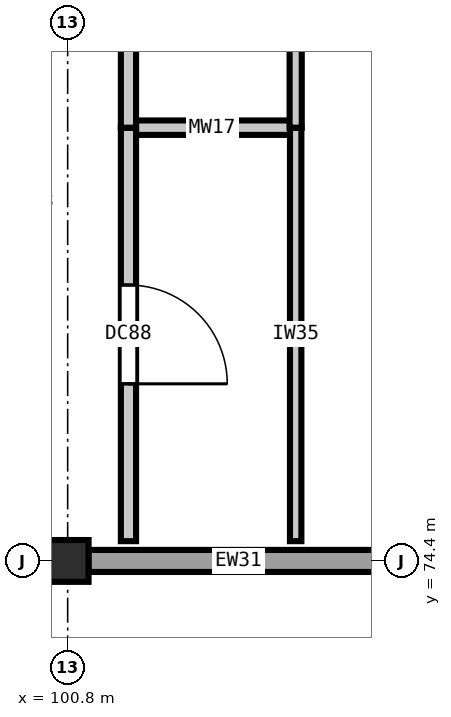
"""IFC4 building model, lengths in metres.
Left out: names, types, materials, properties, quantities, classifications, styles, units other than length and angle.
Written with IfcOpenShell. Run it as: python <this file> out.ifc"""

import sys

from ifc_helpers import new_model, si_unit, direction, frame, frame_2d, origin, origin_2d, place, context, subcontext, project, spatial, rectangle, extrude, element, fill, save


model = new_model("IFC4")
c1 = context("Model", 3, precision=1e-05, world=origin(), true_north=direction((0.0, 1.0)))
c2 = subcontext(c1, "Body", "Model", "MODEL_VIEW")
j1 = project(units=[si_unit("LENGTHUNIT", "METRE"), si_unit("PLANEANGLEUNIT", "RADIAN")], contexts=[c1])
p1 = place(None, origin())
s1 = spatial("IfcSite", under=j1, at=p1, CompositionType="ELEMENT")
p2 = place(p1, origin())
s2 = spatial("IfcBuilding", under=s1, at=p2, CompositionType="ELEMENT")
p3 = place(p2, frame((0.0, 0.0, 20.4)))
s3 = spatial("IfcBuildingStorey", under=s2, at=p3, CompositionType="ELEMENT", Elevation=20.4)
p4 = place(p3, frame((100.8, 74.4, 0.0), z_axis=(0.0, 0.0, 1.0), x_axis=(1.0, 0.0, 0.0)))
e1 = element("IfcColumn", 1, at=p4, inside=s3, PredefinedType="COLUMN", context=c2, shape_type="SweptSolid", body=[
    extrude(rectangle(XDim=0.55, YDim=0.55, at=origin_2d()), origin(), (0.0, 0.0, 1.0), 4.2),
])
p5 = place(p3, frame((108.927, 74.4, 0.0), z_axis=(0.0, 0.0, 1.0), x_axis=(-1.0, 0.0, 0.0)))
e2 = element("IfcWall", 2, at=p5, inside=s3, PredefinedType="SOLIDWALL", context=c2, shape_type="SweptSolid", body=[
    extrude(rectangle(XDim=7.854, YDim=0.29, at=frame_2d((3.927, 0.0))), origin(), (0.0, 0.0, 1.0), 3.48),
])
p6 = place(p5, frame((1.907, 0.0, 0.9)))
e3 = element("IfcOpeningElement", 3, at=p6, cuts=e2, PredefinedType="OPENING", context=c2, shape_type="SweptSolid", body=[
    extrude(rectangle(XDim=1.75, YDim=1.75, at=frame_2d((0.875, 0.875))), frame((0.0, 0.155, 0.0), z_axis=(0.0, -1.0, 0.0), x_axis=(1.0, 0.0, 0.0)), (0.0, 0.0, 1.0), 0.31),
])
p7 = place(p3, frame((101.6, 80.1, 0.0), z_axis=(0.0, 0.0, 1.0), x_axis=(1.0, 0.0, 0.0)))
e4 = element("IfcWall", 4, at=p7, inside=s3, PredefinedType="PLUMBINGWALL", context=c2, shape_type="SweptSolid", body=[
    extrude(rectangle(XDim=2.2, YDim=0.19, at=frame_2d((1.1, 0.0))), origin(), (0.0, 0.0, 1.0), 3.82),
])
p8 = place(p3, frame((101.6, 74.66, 0.0), z_axis=(0.0, 0.0, 1.0), x_axis=(0.0, 1.0, 0.0)))
e5 = element("IfcWall", 5, at=p8, inside=s3, PredefinedType="PARTITIONING", context=c2, shape_type="SweptSolid", body=[
    extrude(rectangle(XDim=5.44, YDim=0.2, at=frame_2d((2.72, 0.0))), origin(), (0.0, 0.0, 1.0), 3.82),
])
p9 = place(p8, frame((2.07, 0.0, 0.0)))
e6 = element("IfcOpeningElement", 6, at=p9, cuts=e5, PredefinedType="OPENING", context=c2, shape_type="SweptSolid", body=[
    extrude(rectangle(XDim=1.3, YDim=2.2, at=frame_2d((0.65, 1.1))), frame((0.0, 0.11, 0.0), z_axis=(0.0, -1.0, 0.0), x_axis=(1.0, 0.0, 0.0)), (0.0, 0.0, 1.0), 0.22),
])
p10 = place(p3, frame((101.6, 80.1, 0.0), z_axis=(0.0, 0.0, 1.0), x_axis=(0.0, 1.0, 0.0)))
e7 = element("IfcWall", 7, at=p10, inside=s3, PredefinedType="PARTITIONING", context=c2, shape_type="SweptSolid", body=[
    extrude(rectangle(XDim=5.7, YDim=0.2, at=frame_2d((2.85, 0.0))), origin(), (0.0, 0.0, 1.0), 3.82),
])
p11 = place(p10, frame((1.1, 0.0, 0.0)))
e8 = element("IfcOpeningElement", 8, at=p11, cuts=e7, PredefinedType="OPENING", context=c2, shape_type="SweptSolid", body=[
    extrude(rectangle(XDim=0.92, YDim=2.1, at=frame_2d((0.46, 1.05))), frame((0.0, 0.11, 0.0), z_axis=(0.0, -1.0, 0.0), x_axis=(1.0, 0.0, 0.0)), (0.0, 0.0, 1.0), 0.22),
])
p12 = place(p3, frame((103.8, 74.66, 0.0), z_axis=(0.0, 0.0, 1.0), x_axis=(0.0, 1.0, 0.0)))
e9 = element("IfcWall", 9, at=p12, inside=s3, PredefinedType="PARTITIONING", context=c2, shape_type="SweptSolid", body=[
    extrude(rectangle(XDim=5.44, YDim=0.15, at=frame_2d((2.72, 0.0))), origin(), (0.0, 0.0, 1.0), 3.82),
])
p13 = place(p3, frame((103.8, 80.1, 0.0), z_axis=(0.0, 0.0, 1.0), x_axis=(0.0, 1.0, 0.0)))
e10 = element("IfcWall", 10, at=p13, inside=s3, PredefinedType="PLUMBINGWALL", context=c2, shape_type="SweptSolid", body=[
    extrude(rectangle(XDim=5.7, YDim=0.16, at=frame_2d((2.85, 0.0))), origin(), (0.0, 0.0, 1.0), 3.82),
])
p14 = place(p9, frame((1.3, 0.0, 0.0), z_axis=(0.0, 0.0, 1.0), x_axis=(-1.0, 0.0, 0.0)))
e11 = element("IfcDoor", 11, at=p14, inside=s3, OperationType="SINGLE_SWING_RIGHT", PredefinedType="DOOR", context=c2, shape_type="SweptSolid", body=[
    extrude(rectangle(XDim=1.3, YDim=2.2, at=frame_2d((0.65, 1.1))), frame((0.0, 0.025, 0.0), z_axis=(0.0, -1.0, 0.0), x_axis=(1.0, 0.0, 0.0)), (0.0, 0.0, 1.0), 0.05),
])
fill(e6, e11)
save(model, sys.argv[1])
